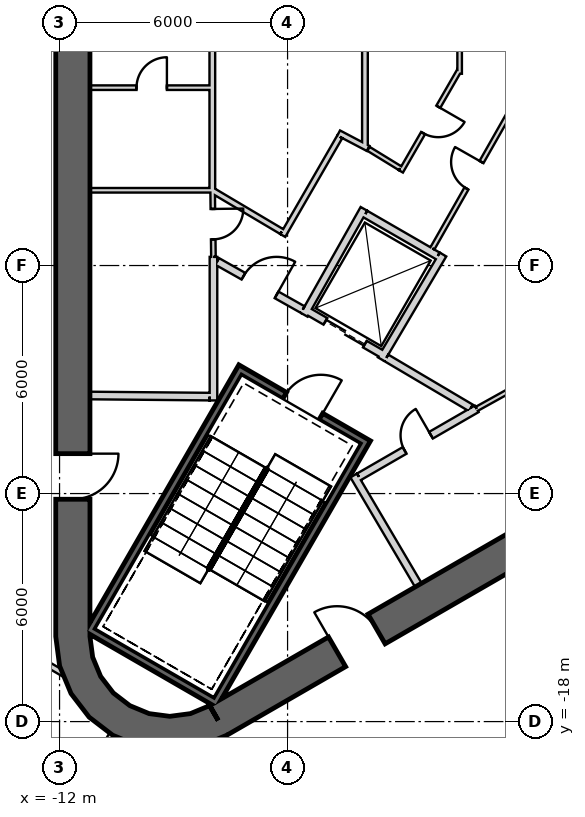
"""IFC4 building model, lengths in metres.
Left out: names, types, materials, properties, quantities, classifications, styles, units other than length and angle.
Written with IfcOpenShell. Run it as: python <this file> out.ifc"""

import sys

from ifc_helpers import new_model, si_unit, direction, frame, frame_2d, origin, place, context, subcontext, project, spatial, polyline, rectangle, outline, extrude, element, fill, save


model = new_model("IFC4")
c1 = context("Model", 3, precision=1e-05, world=origin(), true_north=direction((0.0, 1.0)))
c2 = subcontext(c1, "Body", "Model", "MODEL_VIEW")
j1 = project(units=[si_unit("LENGTHUNIT", "METRE"), si_unit("PLANEANGLEUNIT", "RADIAN")], contexts=[c1])
p1 = place(None, origin())
s1 = spatial("IfcSite", under=j1, at=p1, CompositionType="ELEMENT")
p2 = place(p1, origin())
s2 = spatial("IfcBuilding", under=s1, at=p2, CompositionType="ELEMENT")
p3 = place(p2, frame((0.0, 0.0, -11.0)))
s3 = spatial("IfcBuildingStorey", under=s2, at=p3, CompositionType="ELEMENT", Elevation=-11.0)
p4 = place(p3, frame((33.458, -16.625, -0.4), z_axis=(0.0, 0.0, 1.0), x_axis=(-0.865989988988, -0.500061335211, 0.0)))
e1 = element("IfcWall", 1, at=p4, inside=s3, PredefinedType="SHEAR", context=c2, shape_type="SweptSolid", body=[
    extrude(rectangle(XDim=41.324, YDim=1.2, at=frame_2d((20.662, 0.0))), origin(), (0.0, 0.0, 1.0), 5.9),
])
p5 = place(p3, frame((-11.65, 15.762, -0.4), z_axis=(0.0, 0.0, 1.0), x_axis=(0.0, -1.0, 0.0)))
e2 = element("IfcWall", 2, at=p5, inside=s3, PredefinedType="SHEAR", context=c2, shape_type="SweptSolid", body=[
    extrude(rectangle(XDim=31.523, YDim=0.9, at=frame_2d((15.762, 0.0))), origin(), (0.0, 0.0, 1.0), 5.9),
])
p6 = place(p5, frame((3.612, 0.0, 0.4)))
e3 = element("IfcOpeningElement", 3, at=p6, cuts=e2, PredefinedType="OPENING", context=c2, shape_type="SweptSolid", body=[
    extrude(rectangle(XDim=1.2, YDim=2.4, at=frame_2d((0.6, 1.2))), frame((0.0, 0.46, 0.0), z_axis=(0.0, -1.0, 0.0), x_axis=(1.0, 0.0, 0.0)), (0.0, 0.0, 1.0), 0.92),
])
p7 = place(p5, frame((26.712, 0.0, 0.4)))
e4 = element("IfcOpeningElement", 4, at=p7, cuts=e2, PredefinedType="OPENING", context=c2, shape_type="SweptSolid", body=[
    extrude(rectangle(XDim=1.2, YDim=2.4, at=frame_2d((0.6, 1.2))), frame((0.0, 0.46, 0.0), z_axis=(0.0, -1.0, 0.0), x_axis=(1.0, 0.0, 0.0)), (0.0, 0.0, 1.0), 0.92),
])
p8 = place(p3, frame((-7.825, -17.97, -0.4), z_axis=(0.0, 0.0, 1.0), x_axis=(0.866028369851, 0.499994862586, 0.0)))
e5 = element("IfcWall", 5, at=p8, inside=s3, PredefinedType="SHEAR", context=c2, shape_type="SweptSolid", body=[
    extrude(rectangle(XDim=31.523, YDim=0.9, at=frame_2d((15.762, 0.0))), origin(), (0.0, 0.0, 1.0), 5.9),
])
p9 = place(p8, frame((17.862, 0.0, 0.4)))
e6 = element("IfcOpeningElement", 6, at=p9, cuts=e5, PredefinedType="OPENING", context=c2, shape_type="SweptSolid", body=[
    extrude(rectangle(XDim=1.2, YDim=2.4, at=frame_2d((0.6, 1.2))), frame((0.0, 0.46, 0.0), z_axis=(0.0, -1.0, 0.0), x_axis=(1.0, 0.0, 0.0)), (0.0, 0.0, 1.0), 0.92),
])
p10 = place(p8, frame((20.562, 0.0, 0.4)))
e7 = element("IfcOpeningElement", 7, at=p10, cuts=e5, PredefinedType="OPENING", context=c2, shape_type="SweptSolid", body=[
    extrude(rectangle(XDim=1.2, YDim=2.4, at=frame_2d((0.6, 1.2))), frame((0.0, 0.46, 0.0), z_axis=(0.0, -1.0, 0.0), x_axis=(1.0, 0.0, 0.0)), (0.0, 0.0, 1.0), 0.92),
])
p11 = place(p8, frame((26.712, 0.0, 0.4)))
e8 = element("IfcOpeningElement", 8, at=p11, cuts=e5, PredefinedType="OPENING", context=c2, shape_type="SweptSolid", body=[
    extrude(rectangle(XDim=1.2, YDim=2.4, at=frame_2d((0.6, 1.2))), frame((0.0, 0.46, 0.0), z_axis=(0.0, -1.0, 0.0), x_axis=(1.0, 0.0, 0.0)), (0.0, 0.0, 1.0), 0.92),
])
p12 = place(p8, frame((3.612, 0.0, 0.4)))
e9 = element("IfcOpeningElement", 9, at=p12, cuts=e5, PredefinedType="OPENING", context=c2, shape_type="SweptSolid", body=[
    extrude(rectangle(XDim=1.2, YDim=2.4, at=frame_2d((0.6, 1.2))), frame((0.0, 0.46, 0.0), z_axis=(0.0, -1.0, 0.0), x_axis=(1.0, 0.0, 0.0)), (0.0, 0.0, 1.0), 0.92),
])
p13 = place(p3, frame((0.0, 0.0, -0.4)))
e10 = element("IfcWall", 10, at=p13, inside=s3, PredefinedType="SHEAR", context=c2, shape_type="SweptSolid", body=[
    extrude(outline(polyline([(-12.1, -15.762), (-11.998, -16.538), (-11.698, -17.262), (-11.221, -17.883), (-10.6, -18.36), (-9.876, -18.659), (-9.1, -18.762), (-8.323, -18.659), (-7.6, -18.36), (-8.05, -17.58), (-8.556, -17.79), (-9.1, -17.862), (-9.644, -17.79), (-10.15, -17.58), (-10.585, -17.247), (-10.919, -16.812), (-11.128, -16.305), (-11.2, -15.762), (-12.1, -15.762)])), origin(), (0.0, 0.0, 1.0), 5.9),
])
p14 = place(p3, frame((-3.905, -10.563, -0.4), z_axis=(0.0, 0.0, 1.0), x_axis=(-0.500012932018, -0.866017937352, 0.0)))
e11 = element("IfcWall", 11, at=p14, inside=s3, PredefinedType="SHEAR", context=c2, shape_type="SweptSolid", body=[
    extrude(rectangle(XDim=8.1, YDim=0.2, at=frame_2d((4.05, 0.0))), origin(), (0.0, 0.0, 1.0), 5.5),
])
p15 = place(p3, frame((-11.282, -15.541, -0.4), z_axis=(0.0, 0.0, 1.0), x_axis=(0.866000483506, -0.500043160704, 0.0)))
e12 = element("IfcWall", 12, at=p15, inside=s3, PredefinedType="SHEAR", context=c2, shape_type="SweptSolid", body=[
    extrude(rectangle(XDim=3.8, YDim=0.2, at=frame_2d((1.9, 0.0))), origin(), (0.0, 0.0, 1.0), 5.5),
])
p16 = place(p3, frame((-7.196, -8.663, -0.4), z_axis=(0.0, 0.0, 1.0), x_axis=(-0.499997992926, -0.866026562566, 0.0)))
e13 = element("IfcWall", 13, at=p16, inside=s3, PredefinedType="SHEAR", context=c2, shape_type="SweptSolid", body=[
    extrude(rectangle(XDim=7.9, YDim=0.2, at=frame_2d((3.95, 0.0))), origin(), (0.0, 0.0, 1.0), 5.5),
])
p17 = place(p3, frame((-4.041, -10.599, -0.4), z_axis=(0.0, 0.0, 1.0), x_axis=(-0.866047807691, 0.499961193289, 0.0)))
e14 = element("IfcWall", 14, at=p17, inside=s3, PredefinedType="SHEAR", context=c2, shape_type="SweptSolid", body=[
    extrude(rectangle(XDim=3.6, YDim=0.2, at=frame_2d((1.8, 0.0))), origin(), (0.0, 0.0, 1.0), 5.5),
])
p18 = place(p17, frame((1.25, 0.0, 0.4)))
e15 = element("IfcOpeningElement", 15, at=p18, cuts=e14, PredefinedType="OPENING", context=c2, shape_type="SweptSolid", body=[
    extrude(rectangle(XDim=1.1, YDim=2.1, at=frame_2d((0.55, 1.05))), frame((0.0, 0.11, 0.0), z_axis=(0.0, -1.0, 0.0), x_axis=(1.0, 0.0, 0.0)), (0.0, 0.0, 1.0), 0.22),
])
p19 = place(p3, frame((-3.446, -8.368, 0.0), z_axis=(0.0, 0.0, 1.0), x_axis=(-0.866024647952, 0.500001309137, 0.0)))
e16 = element("IfcWall", 16, at=p19, inside=s3, PredefinedType="PLUMBINGWALL", context=c2, shape_type="SweptSolid", body=[
    extrude(rectangle(XDim=2.4, YDim=0.2, at=frame_2d((1.2, 0.0))), origin(), (0.0, 0.0, 1.0), 5.1),
])
p20 = place(p19, frame((0.6, 0.0, 0.0)))
e17 = element("IfcOpeningElement", 17, at=p20, cuts=e16, PredefinedType="OPENING", context=c2, shape_type="SweptSolid", body=[
    extrude(rectangle(XDim=1.2, YDim=2.4, at=frame_2d((0.6, 1.2))), frame((0.0, 0.11, 0.0), z_axis=(0.0, -1.0, 0.0), x_axis=(1.0, 0.0, 0.0)), (0.0, 0.0, 1.0), 0.22),
])
p21 = place(p3, frame((-3.953, -4.646, 0.0), z_axis=(0.0, 0.0, 1.0), x_axis=(0.86605622881, -0.499946605688, 0.0)))
e18 = element("IfcWall", 18, at=p21, inside=s3, PredefinedType="PLUMBINGWALL", context=c2, shape_type="SweptSolid", body=[
    extrude(rectangle(XDim=2.2, YDim=0.2, at=frame_2d((1.1, 0.0))), origin(), (0.0, 0.0, 1.0), 5.1),
])
p22 = place(p3, frame((-1.91, -5.71, 0.0), z_axis=(0.0, 0.0, 1.0), x_axis=(-0.508616218331, -0.860993346345, 0.0)))
e19 = element("IfcWall", 19, at=p22, inside=s3, PredefinedType="PLUMBINGWALL", context=c2, shape_type="SweptSolid", body=[
    extrude(rectangle(XDim=3.2, YDim=0.2, at=frame_2d((1.6, 0.0))), origin(), (0.0, 0.0, 1.0), 5.1),
])
p23 = place(p3, frame((-3.99, -4.509, 0.0), z_axis=(0.0, 0.0, 1.0), x_axis=(-0.491358283181, -0.870957540612, 0.0)))
e20 = element("IfcWall", 20, at=p23, inside=s3, PredefinedType="PLUMBINGWALL", context=c2, shape_type="SweptSolid", body=[
    extrude(rectangle(XDim=3.2, YDim=0.2, at=frame_2d((1.6, 0.0))), origin(), (0.0, 0.0, 1.0), 5.1),
])
p24 = place(p3, frame((-7.95, -9.55, 0.0), z_axis=(0.0, 0.0, 1.0), x_axis=(0.0, 1.0, 0.0)))
e21 = element("IfcWall", 21, at=p24, inside=s3, PredefinedType="PARTITIONING", context=c2, shape_type="SweptSolid", body=[
    extrude(rectangle(XDim=3.778, YDim=0.2, at=frame_2d((1.889, 0.0))), origin(), (0.0, 0.0, 1.0), 5.1),
])
p25 = place(p3, frame((-11.2, -1.32, 0.0), z_axis=(0.0, 0.0, 1.0), x_axis=(1.0, 0.0, 0.0)))
e22 = element("IfcWall", 22, at=p25, inside=s3, PredefinedType="PARTITIONING", context=c2, shape_type="SweptSolid", body=[
    extrude(rectangle(XDim=3.25, YDim=0.12, at=frame_2d((1.625, 0.0))), origin(), (0.0, 0.0, 1.0), 5.1),
])
p26 = place(p25, frame((1.225, 0.0, 0.0)))
e23 = element("IfcOpeningElement", 23, at=p26, cuts=e22, PredefinedType="OPENING", context=c2, shape_type="SweptSolid", body=[
    extrude(rectangle(XDim=0.8, YDim=2.1, at=frame_2d((0.4, 1.05))), frame((0.0, 0.07, 0.0), z_axis=(0.0, -1.0, 0.0), x_axis=(1.0, 0.0, 0.0)), (0.0, 0.0, 1.0), 0.14),
])
p27 = place(p3, frame((-7.98, 4.05, 0.0), z_axis=(0.0, 0.0, 1.0), x_axis=(0.0, -1.0, 0.0)))
e24 = element("IfcWall", 24, at=p27, inside=s3, PredefinedType="PLUMBINGWALL", context=c2, shape_type="SweptSolid", body=[
    extrude(rectangle(XDim=8.1, YDim=0.15, at=frame_2d((4.05, 0.0))), origin(), (0.0, 0.0, 1.0), 5.1),
])
p28 = place(p27, frame((2.3, 0.0, 0.0)))
e25 = element("IfcOpeningElement", 25, at=p28, cuts=e24, PredefinedType="OPENING", context=c2, shape_type="SweptSolid", body=[
    extrude(rectangle(XDim=0.8, YDim=2.1, at=frame_2d((0.4, 1.05))), frame((0.0, 0.085, 0.0), z_axis=(0.0, -1.0, 0.0), x_axis=(1.0, 0.0, 0.0)), (0.0, 0.0, 1.0), 0.17),
])
p29 = place(p3, frame((-7.95, -4.02, 0.0), z_axis=(0.0, 0.0, 1.0), x_axis=(-1.0, 0.0, 0.0)))
e26 = element("IfcWall", 26, at=p29, inside=s3, PredefinedType="PARTITIONING", context=c2, shape_type="SweptSolid", body=[
    extrude(rectangle(XDim=3.25, YDim=0.12, at=frame_2d((1.625, 0.0))), origin(), (0.0, 0.0, 1.0), 5.1),
])
p30 = place(p3, frame((-11.2, -9.42, 0.0), z_axis=(0.0, 0.0, 1.0), x_axis=(0.999957467379, -0.009222983926, 0.0)))
e27 = element("IfcWall", 27, at=p30, inside=s3, PredefinedType="PARTITIONING", context=c2, shape_type="SweptSolid", body=[
    extrude(rectangle(XDim=3.15, YDim=0.2, at=frame_2d((1.575, 0.0))), origin(), (0.0, 0.0, 1.0), 5.1),
])
p31 = place(p3, frame((-7.951, -5.772, 0.0), z_axis=(0.0, 0.0, 1.0), x_axis=(-0.012047318415, 0.999927428426, 0.0)))
e28 = element("IfcWall", 28, at=p31, inside=s3, PredefinedType="PARTITIONING", context=c2, shape_type="SweptSolid", body=[
    extrude(rectangle(XDim=1.723, YDim=0.12, at=frame_2d((0.861, 0.0))), origin(), (0.0, 0.0, 1.0), 5.1),
])
p32 = place(p31, frame((0.461, 0.0, 0.0)))
e29 = element("IfcOpeningElement", 29, at=p32, cuts=e28, PredefinedType="OPENING", context=c2, shape_type="SweptSolid", body=[
    extrude(rectangle(XDim=0.8, YDim=2.1, at=frame_2d((0.4, 1.05))), frame((0.0, 0.07, 0.0), z_axis=(0.0, -1.0, 0.0), x_axis=(1.0, 0.0, 0.0)), (0.0, 0.0, 1.0), 0.14),
])
p33 = place(p3, frame((-4.26, -11.524, 0.0), z_axis=(0.0, 0.0, 1.0), x_axis=(0.507997497166, -0.861358544901, 0.0)))
e30 = element("IfcWall", 30, at=p33, inside=s3, PredefinedType="PARTITIONING", context=c2, shape_type="SweptSolid", body=[
    extrude(rectangle(XDim=3.35, YDim=0.2, at=frame_2d((1.675, 0.0))), origin(), (0.0, 0.0, 1.0), 5.1),
])
p34 = place(p3, frame((-1.024, -9.771, 0.0), z_axis=(0.0, 0.0, 1.0), x_axis=(-0.866029903013, -0.499992207027, 0.0)))
e31 = element("IfcWall", 31, at=p34, inside=s3, PredefinedType="PARTITIONING", context=c2, shape_type="SweptSolid", body=[
    extrude(rectangle(XDim=3.578, YDim=0.2, at=frame_2d((1.789, 0.0))), origin(), (0.0, 0.0, 1.0), 5.1),
])
p35 = place(p34, frame((1.389, 0.0, 0.0)))
e32 = element("IfcOpeningElement", 32, at=p35, cuts=e31, PredefinedType="OPENING", context=c2, shape_type="SweptSolid", body=[
    extrude(rectangle(XDim=0.8, YDim=2.1, at=frame_2d((0.4, 1.05))), frame((0.0, 0.11, 0.0), z_axis=(0.0, -1.0, 0.0), x_axis=(1.0, 0.0, 0.0)), (0.0, 0.0, 1.0), 0.22),
])
p36 = place(p3, frame((-1.023, -9.772, 0.0), z_axis=(0.0, 0.0, 1.0), x_axis=(0.874290944206, 0.485402250592, 0.0)))
e33 = element("IfcWall", 33, at=p36, inside=s3, PredefinedType="PARTITIONING", context=c2, shape_type="SweptSolid", body=[
    extrude(rectangle(XDim=1.723, YDim=0.12, at=frame_2d((0.861, 0.0))), origin(), (0.0, 0.0, 1.0), 5.1),
])
p37 = place(p3, frame((-3.401, -8.43, 0.0), z_axis=(0.0, 0.0, 1.0), x_axis=(0.860630814782, -0.509229418482, 0.0)))
e34 = element("IfcWall", 34, at=p37, inside=s3, PredefinedType="PARTITIONING", context=c2, shape_type="SweptSolid", body=[
    extrude(rectangle(XDim=2.582, YDim=0.2, at=frame_2d((1.291, 0.0))), origin(), (0.0, 0.0, 1.0), 5.1),
])
p38 = place(p3, frame((-7.85, -5.893, 0.0), z_axis=(0.0, 0.0, 1.0), x_axis=(0.871350695252, -0.490660744185, 0.0)))
e35 = element("IfcWall", 35, at=p38, inside=s3, PredefinedType="PARTITIONING", context=c2, shape_type="SweptSolid", body=[
    extrude(rectangle(XDim=2.582, YDim=0.2, at=frame_2d((1.291, 0.0))), origin(), (0.0, 0.0, 1.0), 5.1),
])
p39 = place(p38, frame((0.791, 0.0, 0.0)))
e36 = element("IfcOpeningElement", 36, at=p39, cuts=e35, PredefinedType="OPENING", context=c2, shape_type="SweptSolid", body=[
    extrude(rectangle(XDim=1.0, YDim=2.1, at=frame_2d((0.5, 1.05))), frame((0.0, 0.11, 0.0), z_axis=(0.0, -1.0, 0.0), x_axis=(1.0, 0.0, 0.0)), (0.0, 0.0, 1.0), 0.22),
])
p40 = place(p3, frame((0.051, -1.611, 0.0), z_axis=(0.0, 0.0, 1.0), x_axis=(-0.49434454467, -0.869266053148, 0.0)))
e37 = element("IfcWall", 37, at=p40, inside=s3, PredefinedType="PARTITIONING", context=c2, shape_type="SweptSolid", body=[
    extrude(rectangle(XDim=4.53, YDim=0.12, at=frame_2d((2.265, 0.0))), origin(), (0.0, 0.0, 1.0), 5.1),
])
p41 = place(p40, frame((1.916, 0.0, 0.0)))
e38 = element("IfcOpeningElement", 38, at=p41, cuts=e37, PredefinedType="OPENING", context=c2, shape_type="SweptSolid", body=[
    extrude(rectangle(XDim=0.8, YDim=2.1, at=frame_2d((0.4, 1.05))), frame((0.0, 0.07, 0.0), z_axis=(0.0, -1.0, 0.0), x_axis=(1.0, 0.0, 0.0)), (0.0, 0.0, 1.0), 0.14),
])
p42 = place(p3, frame((-3.964, -2.908, 0.0), z_axis=(0.0, 0.0, 1.0), x_axis=(0.0, 1.0, 0.0)))
e39 = element("IfcWall", 39, at=p42, inside=s3, PredefinedType="PLUMBINGWALL", context=c2, shape_type="SweptSolid", body=[
    extrude(rectangle(XDim=5.815, YDim=0.15, at=frame_2d((2.908, 0.0))), origin(), (0.0, 0.0, 1.0), 5.1),
])
p43 = place(p3, frame((-4.655, -2.512, 0.0), z_axis=(0.0, 0.0, 1.0), x_axis=(0.885372046241, -0.464883146323, 0.0)))
e40 = element("IfcWall", 40, at=p43, inside=s3, PredefinedType="PLUMBINGWALL", context=c2, shape_type="SweptSolid", body=[
    extrude(rectangle(XDim=0.875, YDim=0.15, at=frame_2d((0.437, 0.0))), origin(), (0.0, 0.0, 1.0), 5.1),
])
p44 = place(p3, frame((-6.126, -5.21, 0.0), z_axis=(0.0, 0.0, 1.0), x_axis=(0.499990139034, 0.866031096941, 0.0)))
e41 = element("IfcWall", 41, at=p44, inside=s3, PredefinedType="PLUMBINGWALL", context=c2, shape_type="SweptSolid", body=[
    extrude(rectangle(XDim=3.0, YDim=0.15, at=frame_2d((1.5, 0.0))), origin(), (0.0, 0.0, 1.0), 5.1),
])
p45 = place(p3, frame((-7.95, -4.041, 0.0), z_axis=(0.0, 0.0, 1.0), x_axis=(0.860090281069, -0.510141851263, 0.0)))
e42 = element("IfcWall", 42, at=p45, inside=s3, PredefinedType="PLUMBINGWALL", context=c2, shape_type="SweptSolid", body=[
    extrude(rectangle(XDim=2.089, YDim=0.15, at=frame_2d((1.045, 0.0))), origin(), (0.0, 0.0, 1.0), 5.1),
])
p46 = place(p3, frame((-1.472, -0.954, 0.0), z_axis=(0.0, 0.0, 1.0), x_axis=(0.0, 1.0, 0.0)))
e43 = element("IfcWall", 43, at=p46, inside=s3, PredefinedType="PARTITIONING", context=c2, shape_type="SweptSolid", body=[
    extrude(rectangle(XDim=1.785, YDim=0.12, at=frame_2d((0.893, 0.0))), origin(), (0.0, 0.0, 1.0), 5.1),
])
p47 = place(p3, frame((-3.016, -3.524, 0.0), z_axis=(0.0, 0.0, 1.0), x_axis=(0.499988681553, 0.866031938394, 0.0)))
e44 = element("IfcWall", 44, at=p47, inside=s3, PredefinedType="PARTITIONING", context=c2, shape_type="SweptSolid", body=[
    extrude(rectangle(XDim=3.069, YDim=0.12, at=frame_2d((1.535, 0.0))), origin(), (0.0, 0.0, 1.0), 5.1),
])
p48 = place(p47, frame((1.165, 0.0, 0.0)))
e45 = element("IfcOpeningElement", 45, at=p48, cuts=e44, PredefinedType="OPENING", context=c2, shape_type="SweptSolid", body=[
    extrude(rectangle(XDim=0.8, YDim=2.1, at=frame_2d((0.4, 1.05))), frame((0.0, 0.07, 0.0), z_axis=(0.0, -1.0, 0.0), x_axis=(1.0, 0.0, 0.0)), (0.0, 0.0, 1.0), 0.14),
])
p49 = place(p3, frame((-3.87, -2.93, 0.0), z_axis=(0.0, 0.0, 1.0), x_axis=(0.852489850103, -0.522743776119, 0.0)))
e46 = element("IfcWall", 46, at=p49, inside=s3, PredefinedType="PARTITIONING", context=c2, shape_type="SweptSolid", body=[
    extrude(rectangle(XDim=0.977, YDim=0.12, at=frame_2d((0.488, 0.0))), origin(), (0.0, 0.0, 1.0), 5.1),
])
p50 = place(p3, frame((-4.236, -21.175, 0.0), z_axis=(0.0, 0.0, 1.0), x_axis=(0.864433297723, 0.502747524895, 0.0)))
e47 = element("IfcWall", 47, at=p50, inside=s3, PredefinedType="PARTITIONING", context=c2, shape_type="SweptSolid", body=[
    extrude(rectangle(XDim=6.244, YDim=0.12, at=frame_2d((3.122, 0.0))), origin(), (0.0, 0.0, 1.0), 4.68),
])
p51 = place(p3, frame((-16.2, -14.226, 0.0), z_axis=(0.0, 0.0, 1.0), x_axis=(0.863501067027, -0.504347010741, 0.0)))
e48 = element("IfcWall", 48, at=p51, inside=s3, PredefinedType="PLUMBINGWALL", context=c2, shape_type="SweptSolid", body=[
    extrude(rectangle(XDim=5.166, YDim=0.15, at=frame_2d((2.583, 0.0))), origin(), (0.0, 0.0, 1.0), 4.18),
])
p52 = place(p3, frame((-10.549, -18.212, 0.0), z_axis=(0.0, 0.0, 1.0), x_axis=(-0.500006121477, -0.866021869519, 0.0)))
e49 = element("IfcWall", 49, at=p52, inside=s3, PredefinedType="PLUMBINGWALL", context=c2, shape_type="SweptSolid", body=[
    extrude(rectangle(XDim=4.42, YDim=0.15, at=frame_2d((2.21, 0.0))), origin(), (0.0, 0.0, 1.0), 4.07),
])
p53 = place(p18, origin())
e50 = element("IfcDoor", 50, at=p53, inside=s3, OperationType="SINGLE_SWING_LEFT", PredefinedType="USERDEFINED", context=c2, shape_type="SweptSolid", body=[
    extrude(rectangle(XDim=1.1, YDim=2.1, at=frame_2d((0.55, 1.05))), frame((0.0, 0.025, 0.0), z_axis=(0.0, -1.0, 0.0), x_axis=(1.0, 0.0, 0.0)), (0.0, 0.0, 1.0), 0.05),
])
fill(e15, e50)
p54 = place(p39, origin())
e51 = element("IfcDoor", 51, at=p54, inside=s3, OperationType="SINGLE_SWING_RIGHT", PredefinedType="USERDEFINED", context=c2, shape_type="SweptSolid", body=[
    extrude(rectangle(XDim=1.0, YDim=2.1, at=frame_2d((0.5, 1.05))), frame((0.0, 0.025, 0.0), z_axis=(0.0, -1.0, 0.0), x_axis=(1.0, 0.0, 0.0)), (0.0, 0.0, 1.0), 0.05),
])
fill(e36, e51)
p55 = place(p20, origin())
e52 = element("IfcDoor", 52, at=p55, inside=s3, OperationType="SLIDING_TO_LEFT", PredefinedType="USERDEFINED", context=c2, shape_type="SweptSolid", body=[
    extrude(rectangle(XDim=1.2, YDim=2.4, at=frame_2d((0.6, 1.2))), frame((0.0, 0.025, 0.0), z_axis=(0.0, -1.0, 0.0), x_axis=(1.0, 0.0, 0.0)), (0.0, 0.0, 1.0), 0.05),
])
fill(e17, e52)
p56 = place(p41, origin())
e53 = element("IfcDoor", 53, at=p56, inside=s3, OperationType="SINGLE_SWING_LEFT", PredefinedType="USERDEFINED", context=c2, shape_type="SweptSolid", body=[
    extrude(rectangle(XDim=0.8, YDim=2.1, at=frame_2d((0.4, 1.05))), frame((0.0, 0.025, 0.0), z_axis=(0.0, -1.0, 0.0), x_axis=(1.0, 0.0, 0.0)), (0.0, 0.0, 1.0), 0.05),
])
fill(e38, e53)
p57 = place(p48, origin())
e54 = element("IfcDoor", 54, at=p57, inside=s3, OperationType="SINGLE_SWING_RIGHT", PredefinedType="USERDEFINED", context=c2, shape_type="SweptSolid", body=[
    extrude(rectangle(XDim=0.8, YDim=2.1, at=frame_2d((0.4, 1.05))), frame((0.0, 0.025, 0.0), z_axis=(0.0, -1.0, 0.0), x_axis=(1.0, 0.0, 0.0)), (0.0, 0.0, 1.0), 0.05),
])
fill(e45, e54)
p58 = place(p26, origin())
e55 = element("IfcDoor", 55, at=p58, inside=s3, OperationType="SINGLE_SWING_RIGHT", PredefinedType="USERDEFINED", context=c2, shape_type="SweptSolid", body=[
    extrude(rectangle(XDim=0.8, YDim=2.1, at=frame_2d((0.4, 1.05))), frame((0.0, 0.025, 0.0), z_axis=(0.0, -1.0, 0.0), x_axis=(1.0, 0.0, 0.0)), (0.0, 0.0, 1.0), 0.05),
])
fill(e23, e55)
p59 = place(p32, origin())
e56 = element("IfcDoor", 56, at=p59, inside=s3, OperationType="SINGLE_SWING_RIGHT", PredefinedType="USERDEFINED", context=c2, shape_type="SweptSolid", body=[
    extrude(rectangle(XDim=0.8, YDim=2.1, at=frame_2d((0.4, 1.05))), frame((0.0, 0.025, 0.0), z_axis=(0.0, -1.0, 0.0), x_axis=(1.0, 0.0, 0.0)), (0.0, 0.0, 1.0), 0.05),
])
fill(e29, e56)
p60 = place(p35, origin())
e57 = element("IfcDoor", 57, at=p60, inside=s3, OperationType="SINGLE_SWING_LEFT", PredefinedType="USERDEFINED", context=c2, shape_type="SweptSolid", body=[
    extrude(rectangle(XDim=0.8, YDim=2.1, at=frame_2d((0.4, 1.05))), frame((0.0, 0.025, 0.0), z_axis=(0.0, -1.0, 0.0), x_axis=(1.0, 0.0, 0.0)), (0.0, 0.0, 1.0), 0.05),
])
fill(e32, e57)
p61 = place(p7, origin())
e58 = element("IfcDoor", 58, at=p61, inside=s3, OperationType="SINGLE_SWING_LEFT", PredefinedType="USERDEFINED", context=c2, shape_type="SweptSolid", body=[
    extrude(rectangle(XDim=1.2, YDim=2.4, at=frame_2d((0.6, 1.2))), frame((0.0, 0.025, 0.0), z_axis=(0.0, -1.0, 0.0), x_axis=(1.0, 0.0, 0.0)), (0.0, 0.0, 1.0), 0.05),
])
fill(e4, e58)
p62 = place(p12, origin())
e59 = element("IfcDoor", 59, at=p62, inside=s3, OperationType="SINGLE_SWING_LEFT", PredefinedType="USERDEFINED", context=c2, shape_type="SweptSolid", body=[
    extrude(rectangle(XDim=1.2, YDim=2.4, at=frame_2d((0.6, 1.2))), frame((0.0, 0.025, 0.0), z_axis=(0.0, -1.0, 0.0), x_axis=(1.0, 0.0, 0.0)), (0.0, 0.0, 1.0), 0.05),
])
fill(e9, e59)
save(model, sys.argv[1])
